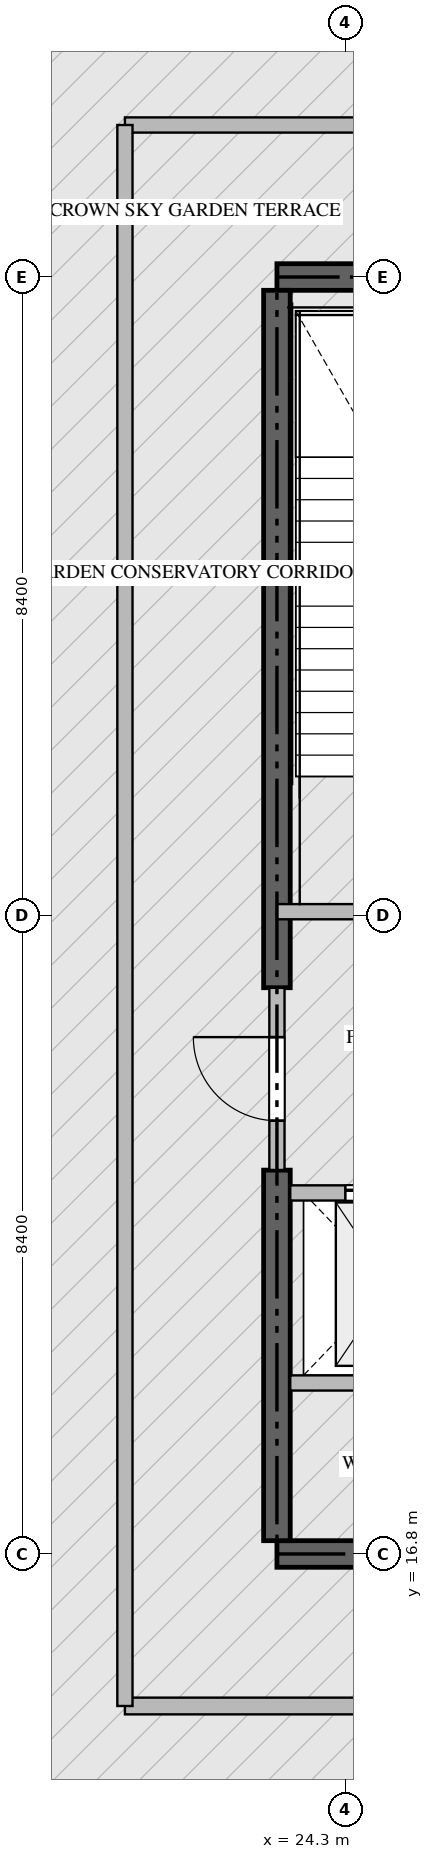
"""IFC4 building model, lengths in metres.
Left out: names, types, materials, properties, quantities, classifications, styles, units other than length and angle.
Written with IfcOpenShell. Run it as: python <this file> out.ifc"""

import sys

from ifc_helpers import new_model, si_unit, direction, frame, frame_2d, origin, place, context, subcontext, project, spatial, rectangle, extrude, source, transform, mapped, element, fill, save


model = new_model("IFC4")
c1 = context("Model", 3, precision=1e-05, world=origin(), true_north=direction((0.0, 1.0)))
c2 = subcontext(c1, "Body", "Model", "MODEL_VIEW")
j1 = project(units=[si_unit("LENGTHUNIT", "METRE"), si_unit("PLANEANGLEUNIT", "RADIAN")], contexts=[c1])
p1 = place(None, origin())
s1 = spatial("IfcSite", under=j1, at=p1, CompositionType="ELEMENT")
p2 = place(p1, origin())
s2 = spatial("IfcBuilding", under=s1, at=p2, CompositionType="ELEMENT")
p3 = place(p2, frame((0.0, 0.0, 359.75)))
s3 = spatial("IfcBuildingStorey", under=s2, at=p3, CompositionType="ELEMENT", Elevation=359.75)
for number, where, z_axis, x_axis in (
    (1, (23.4, 16.8, -0.36), (0.0, 0.0, 1.0), (1.0, 0.0, 0.0)),
    (2, (41.4, 33.6, -0.36), (0.0, 0.0, 1.0), (-1.0, 0.0, 0.0)),
):
    element("IfcWall", number, at=place(p3, frame(where, z_axis=z_axis, x_axis=x_axis)), inside=s3, PredefinedType="SHEAR", context=c2, shape_type="SweptSolid", body=[
        extrude(rectangle(XDim=18.0, YDim=0.35, at=frame_2d((9.0, 0.0))), origin(), (0.0, 0.0, 1.0), 5.998),
    ])
p4 = place(p3, frame((23.4, 16.975, -0.36), z_axis=(0.0, 0.0, 1.0), x_axis=(0.0, 1.0, 0.0)))
e3 = element("IfcWall", 3, at=p4, inside=s3, PredefinedType="SHEAR", context=c2, shape_type="SweptSolid", body=[
    extrude(rectangle(XDim=4.875, YDim=0.35, at=frame_2d((2.438, 0.0))), origin(), (0.0, 0.0, 1.0), 5.998),
])
p5 = place(p3, frame((23.4, 24.25, -0.36), z_axis=(0.0, 0.0, 1.0), x_axis=(0.0, 1.0, 0.0)))
e4 = element("IfcWall", 4, at=p5, inside=s3, PredefinedType="SHEAR", context=c2, shape_type="SweptSolid", body=[
    extrude(rectangle(XDim=9.175, YDim=0.35, at=frame_2d((4.587, 0.0))), origin(), (0.0, 0.0, 1.0), 5.998),
])
p6 = place(p3, frame((21.4, 14.8, 0.0), z_axis=(0.0, 0.0, 1.0), x_axis=(1.0, 0.0, 0.0)))
e5 = element("IfcWall", 5, at=p6, inside=s3, PredefinedType="ELEMENTEDWALL", context=c2, shape_type="SweptSolid", body=[
    extrude(rectangle(XDim=22.0, YDim=0.22, at=frame_2d((11.0, 0.0))), origin(), (0.0, 0.0, 1.0), 5.625),
])
p7 = place(p6, frame((10.2, 0.0, 0.0)))
e6 = element("IfcOpeningElement", 6, at=p7, cuts=e5, PredefinedType="OPENING", context=c2, shape_type="SweptSolid", body=[
    extrude(rectangle(XDim=1.6, YDim=2.3, at=frame_2d((0.8, 1.15))), frame((0.0, 0.12, 0.0), z_axis=(0.0, -1.0, 0.0), x_axis=(1.0, 0.0, 0.0)), (0.0, 0.0, 1.0), 0.24),
])
p8 = place(p3, frame((23.4, 25.25, 0.0), z_axis=(0.0, 0.0, 1.0), x_axis=(1.0, 0.0, 0.0)))
e7 = element("IfcWall", 7, at=p8, inside=s3, PredefinedType="STANDARD", context=c2, shape_type="SweptSolid", body=[
    extrude(rectangle(XDim=4.45, YDim=0.2, at=frame_2d((2.225, 0.0))), origin(), (0.0, 0.0, 1.0), 5.64),
])
p9 = place(p8, frame((1.65, 0.0, 0.0)))
e8 = element("IfcOpeningElement", 8, at=p9, cuts=e7, PredefinedType="OPENING", context=c2, shape_type="SweptSolid", body=[
    extrude(rectangle(XDim=1.1, YDim=2.15, at=frame_2d((0.55, 1.075))), frame((0.0, 0.11, 0.0), z_axis=(0.0, -1.0, 0.0), x_axis=(1.0, 0.0, 0.0)), (0.0, 0.0, 1.0), 0.22),
])
p10 = place(p3, frame((23.575, 21.55, 0.0), z_axis=(0.0, 0.0, 1.0), x_axis=(1.0, 0.0, 0.0)))
e9 = element("IfcWall", 9, at=p10, inside=s3, PredefinedType="STANDARD", context=c2, shape_type="SweptSolid", body=[
    extrude(rectangle(XDim=2.475, YDim=0.2, at=frame_2d((1.238, 0.0))), origin(), (0.0, 0.0, 1.0), 5.64),
])
p11 = place(p10, frame((0.725, 0.0, 0.0)))
e10 = element("IfcOpeningElement", 10, at=p11, cuts=e9, PredefinedType="OPENING", context=c2, shape_type="SweptSolid", body=[
    extrude(rectangle(XDim=1.2, YDim=2.2, at=frame_2d((0.6, 1.1))), frame((0.0, 0.11, 0.0), z_axis=(0.0, -1.0, 0.0), x_axis=(1.0, 0.0, 0.0)), (0.0, 0.0, 1.0), 0.22),
])
p12 = place(p3, frame((23.575, 19.05, 0.0), z_axis=(0.0, 0.0, 1.0), x_axis=(1.0, 0.0, 0.0)))
e11 = element("IfcWall", 11, at=p12, inside=s3, PredefinedType="STANDARD", context=c2, shape_type="SweptSolid", body=[
    extrude(rectangle(XDim=2.475, YDim=0.2, at=frame_2d((1.238, 0.0))), origin(), (0.0, 0.0, 1.0), 5.64),
])
p13 = place(p3, frame((23.4, 21.852, 0.0), z_axis=(0.0, 0.0, 1.0), x_axis=(0.0, 1.0, 0.0)))
e12 = element("IfcWall", 12, at=p13, inside=s3, PredefinedType="STANDARD", context=c2, shape_type="SweptSolid", body=[
    extrude(rectangle(XDim=2.396, YDim=0.2, at=frame_2d((1.198, 0.0))), origin(), (0.0, 0.0, 1.0), 5.64),
])
p14 = place(p13, frame((0.648, 0.0, 0.0)))
e13 = element("IfcOpeningElement", 13, at=p14, cuts=e12, PredefinedType="OPENING", context=c2, shape_type="SweptSolid", body=[
    extrude(rectangle(XDim=1.1, YDim=2.15, at=frame_2d((0.55, 1.075))), frame((0.0, 0.11, 0.0), z_axis=(0.0, -1.0, 0.0), x_axis=(1.0, 0.0, 0.0)), (0.0, 0.0, 1.0), 0.22),
])
p15 = place(p3, frame((21.4, 35.6, 0.0), z_axis=(0.0, 0.0, 1.0), x_axis=(1.0, 0.0, 0.0)))
e14 = element("IfcWall", 14, at=p15, inside=s3, PredefinedType="STANDARD", context=c2, shape_type="SweptSolid", body=[
    extrude(rectangle(XDim=22.0, YDim=0.2, at=frame_2d((11.0, 0.0))), origin(), (0.0, 0.0, 1.0), 5.64),
])
p16 = place(p15, frame((10.25, 0.0, 0.0)))
e15 = element("IfcOpeningElement", 15, at=p16, cuts=e14, PredefinedType="OPENING", context=c2, shape_type="SweptSolid", body=[
    extrude(rectangle(XDim=1.5, YDim=2.25, at=frame_2d((0.75, 1.125))), frame((0.0, 0.11, 0.0), z_axis=(0.0, -1.0, 0.0), x_axis=(1.0, 0.0, 0.0)), (0.0, 0.0, 1.0), 0.22),
])
p17 = place(p3, frame((21.4, 14.8, 0.0), z_axis=(0.0, 0.0, 1.0), x_axis=(0.0, 1.0, 0.0)))
e16 = element("IfcWall", 16, at=p17, inside=s3, PredefinedType="STANDARD", context=c2, shape_type="SweptSolid", body=[
    extrude(rectangle(XDim=20.8, YDim=0.2, at=frame_2d((10.4, 0.0))), origin(), (0.0, 0.0, 1.0), 5.64),
])
m1 = source(origin(), c2, "Body", "SweptSolid", [
    extrude(rectangle(XDim=1.2, YDim=2.2, at=frame_2d((0.6, 1.1))), frame((0.0, 0.025, 0.0), z_axis=(0.0, -1.0, 0.0), x_axis=(1.0, 0.0, 0.0)), (0.0, 0.0, 1.0), 0.05),
])
p18 = place(p11, origin())
e17 = element("IfcDoor", 17, at=p18, inside=s3, OperationType="DOUBLE_DOOR_SLIDING", PredefinedType="DOOR", context=c2, shape_type="MappedRepresentation", body=[
    mapped(m1, transform((0.0, 0.0, 0.0), scale=1.0)),
])
fill(e10, e17)
m2 = source(origin(), c2, "Body", "SweptSolid", [
    extrude(rectangle(XDim=1.1, YDim=2.15, at=frame_2d((0.55, 1.075))), frame((0.0, 0.025, 0.0), z_axis=(0.0, -1.0, 0.0), x_axis=(1.0, 0.0, 0.0)), (0.0, 0.0, 1.0), 0.05),
])
p19 = place(p14, origin())
e18 = element("IfcDoor", 18, at=p19, inside=s3, OperationType="SINGLE_SWING_RIGHT", PredefinedType="DOOR", context=c2, shape_type="MappedRepresentation", body=[
    mapped(m2, transform((0.0, 0.0, 0.0), scale=1.0)),
])
fill(e13, e18)
save(model, sys.argv[1])
